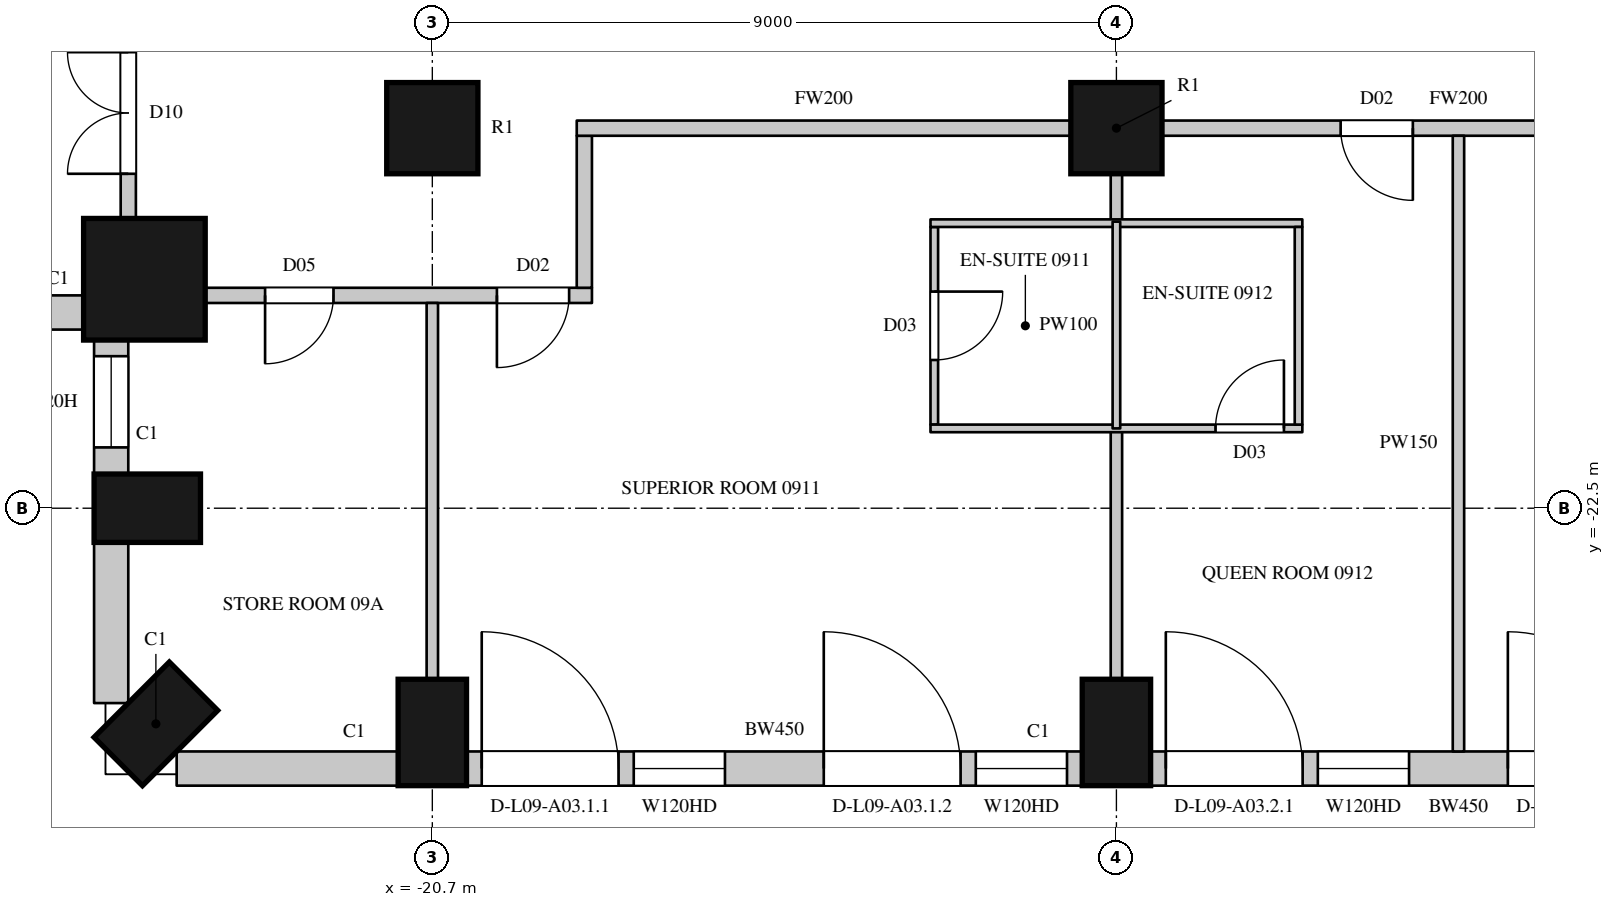
"""IFC4 building model, lengths in metres.
Left out: names, types, materials, properties, quantities, classifications, styles, units other than length and angle.
Written with IfcOpenShell. Run it as: python <this file> out.ifc"""

import sys

from ifc_helpers import new_model, si_unit, direction, frame, frame_2d, origin, origin_2d, place, context, subcontext, project, spatial, rectangle, circle, extrude, element, fill, save


model = new_model("IFC4")
c1 = context("Model", 3, precision=1e-05, world=origin(), true_north=direction((0.0, 1.0)))
c2 = subcontext(c1, "Body", "Model", "MODEL_VIEW")
j1 = project(units=[si_unit("LENGTHUNIT", "METRE"), si_unit("PLANEANGLEUNIT", "RADIAN")], contexts=[c1])
p1 = place(None, origin())
s1 = spatial("IfcSite", under=j1, at=p1, CompositionType="ELEMENT")
p2 = place(p1, origin())
s2 = spatial("IfcBuilding", under=s1, at=p2, CompositionType="ELEMENT")
p3 = place(p2, frame((0.0, 0.0, 62.7)))
s3 = spatial("IfcBuildingStorey", under=s2, at=p3, CompositionType="ELEMENT", Elevation=62.7)
p4 = place(p3, frame((-24.488, -19.488, 0.0), z_axis=(0.0, 0.0, 1.0), x_axis=(1.0, 0.0, 0.0)))
e1 = element("IfcColumn", 1, at=p4, inside=s3, PredefinedType="COLUMN", context=c2, shape_type="SweptSolid", body=[
    extrude(circle(Radius=0.8, at=origin_2d()), origin(), (0.0, 0.0, 1.0), 3.6),
])
for number, where, z_axis, x_axis in (
    (2, (-24.45, -22.5, 0.0), (0.0, 0.0, 1.0), (0.0, -1.0, 0.0)),
    (3, (-24.337, -25.337, 0.0), (0.0, 0.0, 1.0), (0.707, -0.707, 0.0)),
    (4, (-20.7, -25.45, 0.0), (0.0, 0.0, 1.0), (1.0, 0.0, 0.0)),
    (5, (-11.7, -25.45, 0.0), (0.0, 0.0, 1.0), (1.0, 0.0, 0.0)),
):
    element("IfcColumn", number, at=place(p3, frame(where, z_axis=z_axis, x_axis=x_axis)), inside=s3, PredefinedType="COLUMN", context=c2, shape_type="SweptSolid", body=[
        extrude(rectangle(XDim=0.9, YDim=1.4, at=origin_2d()), origin(), (0.0, 0.0, 1.0), 3.6),
    ])
for number, where, z_axis, x_axis in (
    (6, (-20.7, -17.5, 0.0), (0.0, 0.0, 1.0), (1.0, 0.0, 0.0)),
    (7, (-11.7, -17.5, 0.0), (0.0, 0.0, 1.0), (1.0, 0.0, 0.0)),
):
    element("IfcColumn", number, at=place(p3, frame(where, z_axis=z_axis, x_axis=x_axis)), inside=s3, PredefinedType="COLUMN", context=c2, shape_type="SweptSolid", body=[
        extrude(circle(Radius=0.6, at=origin_2d()), origin(), (0.0, 0.0, 1.0), 3.6),
    ])
p5 = place(p3, frame((-29.064, -19.925, 0.0), z_axis=(0.0, 0.0, 1.0), x_axis=(1.0, 0.0, 0.0)))
e8 = element("IfcWall", 8, at=p5, inside=s3, PredefinedType="SOLIDWALL", context=c2, shape_type="SweptSolid", body=[
    extrude(rectangle(XDim=3.805, YDim=0.45, at=frame_2d((1.903, 0.0))), origin(), (0.0, 0.0, 1.0), 3.3),
])
p6 = place(p5, frame((0.514, 0.0, 1.05)))
e9 = element("IfcOpeningElement", 9, at=p6, cuts=e8, PredefinedType="OPENING", context=c2, shape_type="SweptSolid", body=[
    extrude(rectangle(XDim=2.7, YDim=2.0, at=frame_2d((1.35, 1.0))), frame((0.0, 0.235, 0.0), z_axis=(0.0, -1.0, 0.0), x_axis=(1.0, 0.0, 0.0)), (0.0, 0.0, 1.0), 0.47),
])
p7 = place(p3, frame((-24.925, -20.259, 0.0), z_axis=(0.0, 0.0, 1.0), x_axis=(0.0, -1.0, 0.0)))
e10 = element("IfcWall", 10, at=p7, inside=s3, PredefinedType="SOLIDWALL", context=c2, shape_type="SweptSolid", body=[
    extrude(rectangle(XDim=1.792, YDim=0.45, at=frame_2d((0.896, 0.0))), origin(), (0.0, 0.0, 1.0), 3.3),
])
p8 = place(p7, frame((0.241, 0.0, 1.05)))
e11 = element("IfcOpeningElement", 11, at=p8, cuts=e10, PredefinedType="OPENING", context=c2, shape_type="SweptSolid", body=[
    extrude(rectangle(XDim=1.2, YDim=2.0, at=frame_2d((0.6, 1.0))), frame((0.0, 0.235, 0.0), z_axis=(0.0, -1.0, 0.0), x_axis=(1.0, 0.0, 0.0)), (0.0, 0.0, 1.0), 0.47),
])
p9 = place(p3, frame((-24.925, -22.95, 0.0), z_axis=(0.0, 0.0, 1.0), x_axis=(0.0, -1.0, 0.0)))
e12 = element("IfcWall", 12, at=p9, inside=s3, PredefinedType="SOLIDWALL", context=c2, shape_type="SweptSolid", body=[
    extrude(rectangle(XDim=2.114, YDim=0.45, at=frame_2d((1.057, 0.0))), origin(), (0.0, 0.0, 1.0), 3.3),
])
p10 = place(p3, frame((-24.064, -25.925, 0.0), z_axis=(0.0, 0.0, 1.0), x_axis=(1.0, 0.0, 0.0)))
e13 = element("IfcWall", 13, at=p10, inside=s3, PredefinedType="SOLIDWALL", context=c2, shape_type="SweptSolid", body=[
    extrude(rectangle(XDim=2.914, YDim=0.45, at=frame_2d((1.457, 0.0))), origin(), (0.0, 0.0, 1.0), 3.3),
])
p11 = place(p3, frame((-20.25, -25.925, 0.0), z_axis=(0.0, 0.0, 1.0), x_axis=(1.0, 0.0, 0.0)))
e14 = element("IfcWall", 14, at=p11, inside=s3, PredefinedType="SOLIDWALL", context=c2, shape_type="SweptSolid", body=[
    extrude(rectangle(XDim=8.1, YDim=0.45, at=frame_2d((4.05, 0.0))), origin(), (0.0, 0.0, 1.0), 3.3),
])
p12 = place(p11, frame((0.2, 0.0, 0.0)))
e15 = element("IfcOpeningElement", 15, at=p12, cuts=e14, PredefinedType="OPENING", context=c2, shape_type="SweptSolid", body=[
    extrude(rectangle(XDim=1.8, YDim=2.4, at=frame_2d((0.9, 1.2))), frame((0.0, 0.235, 0.0), z_axis=(0.0, -1.0, 0.0), x_axis=(1.0, 0.0, 0.0)), (0.0, 0.0, 1.0), 0.47),
])
p13 = place(p11, frame((2.2, 0.0, 1.05)))
e16 = element("IfcOpeningElement", 16, at=p13, cuts=e14, PredefinedType="OPENING", context=c2, shape_type="SweptSolid", body=[
    extrude(rectangle(XDim=1.2, YDim=2.0, at=frame_2d((0.6, 1.0))), frame((0.0, 0.235, 0.0), z_axis=(0.0, -1.0, 0.0), x_axis=(1.0, 0.0, 0.0)), (0.0, 0.0, 1.0), 0.47),
])
p14 = place(p11, frame((4.7, 0.0, 0.0)))
e17 = element("IfcOpeningElement", 17, at=p14, cuts=e14, PredefinedType="OPENING", context=c2, shape_type="SweptSolid", body=[
    extrude(rectangle(XDim=1.8, YDim=2.4, at=frame_2d((0.9, 1.2))), frame((0.0, 0.235, 0.0), z_axis=(0.0, -1.0, 0.0), x_axis=(1.0, 0.0, 0.0)), (0.0, 0.0, 1.0), 0.47),
])
p15 = place(p11, frame((6.7, 0.0, 1.05)))
e18 = element("IfcOpeningElement", 18, at=p15, cuts=e14, PredefinedType="OPENING", context=c2, shape_type="SweptSolid", body=[
    extrude(rectangle(XDim=1.2, YDim=2.0, at=frame_2d((0.6, 1.0))), frame((0.0, 0.235, 0.0), z_axis=(0.0, -1.0, 0.0), x_axis=(1.0, 0.0, 0.0)), (0.0, 0.0, 1.0), 0.47),
])
p16 = place(p3, frame((-11.25, -25.925, 0.0), z_axis=(0.0, 0.0, 1.0), x_axis=(1.0, 0.0, 0.0)))
e19 = element("IfcWall", 19, at=p16, inside=s3, PredefinedType="SOLIDWALL", context=c2, shape_type="SweptSolid", body=[
    extrude(rectangle(XDim=8.1, YDim=0.45, at=frame_2d((4.05, 0.0))), origin(), (0.0, 0.0, 1.0), 3.3),
])
p17 = place(p16, frame((0.2, 0.0, 0.0)))
e20 = element("IfcOpeningElement", 20, at=p17, cuts=e19, PredefinedType="OPENING", context=c2, shape_type="SweptSolid", body=[
    extrude(rectangle(XDim=1.8, YDim=2.4, at=frame_2d((0.9, 1.2))), frame((0.0, 0.235, 0.0), z_axis=(0.0, -1.0, 0.0), x_axis=(1.0, 0.0, 0.0)), (0.0, 0.0, 1.0), 0.47),
])
p18 = place(p16, frame((2.2, 0.0, 1.05)))
e21 = element("IfcOpeningElement", 21, at=p18, cuts=e19, PredefinedType="OPENING", context=c2, shape_type="SweptSolid", body=[
    extrude(rectangle(XDim=1.2, YDim=2.0, at=frame_2d((0.6, 1.0))), frame((0.0, 0.235, 0.0), z_axis=(0.0, -1.0, 0.0), x_axis=(1.0, 0.0, 0.0)), (0.0, 0.0, 1.0), 0.47),
])
p19 = place(p16, frame((4.7, 0.0, 0.0)))
e22 = element("IfcOpeningElement", 22, at=p19, cuts=e19, PredefinedType="OPENING", context=c2, shape_type="SweptSolid", body=[
    extrude(rectangle(XDim=1.8, YDim=2.4, at=frame_2d((0.9, 1.2))), frame((0.0, 0.235, 0.0), z_axis=(0.0, -1.0, 0.0), x_axis=(1.0, 0.0, 0.0)), (0.0, 0.0, 1.0), 0.47),
])
p20 = place(p16, frame((6.7, 0.0, 1.05)))
e23 = element("IfcOpeningElement", 23, at=p20, cuts=e19, PredefinedType="OPENING", context=c2, shape_type="SweptSolid", body=[
    extrude(rectangle(XDim=1.2, YDim=2.0, at=frame_2d((0.6, 1.0))), frame((0.0, 0.235, 0.0), z_axis=(0.0, -1.0, 0.0), x_axis=(1.0, 0.0, 0.0)), (0.0, 0.0, 1.0), 0.47),
])
p21 = place(p3, frame((-24.7, -18.7, 0.0), z_axis=(0.0, 0.0, 1.0), x_axis=(0.0, 1.0, 0.0)))
e24 = element("IfcWall", 24, at=p21, inside=s3, PredefinedType="PARTITIONING", context=c2, shape_type="SweptSolid", body=[
    extrude(rectangle(XDim=2.67, YDim=0.2, at=frame_2d((1.335, 0.0))), origin(), (0.0, 0.0, 1.0), 3.3),
])
p22 = place(p21, frame((0.6, 0.0, 0.0)))
e25 = element("IfcOpeningElement", 25, at=p22, cuts=e24, PredefinedType="OPENING", context=c2, shape_type="SweptSolid", body=[
    extrude(rectangle(XDim=1.6, YDim=2.4, at=frame_2d((0.8, 1.2))), frame((0.0, 0.11, 0.0), z_axis=(0.0, -1.0, 0.0), x_axis=(1.0, 0.0, 0.0)), (0.0, 0.0, 1.0), 0.22),
])
p23 = place(p3, frame((-23.7, -19.7, 0.0), z_axis=(0.0, 0.0, 1.0), x_axis=(1.0, 0.0, 0.0)))
e26 = element("IfcWall", 26, at=p23, inside=s3, PredefinedType="PARTITIONING", context=c2, shape_type="SweptSolid", body=[
    extrude(rectangle(XDim=5.1, YDim=0.2, at=frame_2d((2.55, 0.0))), origin(), (0.0, 0.0, 1.0), 3.3),
])
p24 = place(p23, frame((0.8, 0.0, 0.0)))
e27 = element("IfcOpeningElement", 27, at=p24, cuts=e26, PredefinedType="OPENING", context=c2, shape_type="SweptSolid", body=[
    extrude(rectangle(XDim=0.9, YDim=2.2, at=frame_2d((0.45, 1.1))), frame((0.0, 0.11, 0.0), z_axis=(0.0, -1.0, 0.0), x_axis=(1.0, 0.0, 0.0)), (0.0, 0.0, 1.0), 0.22),
])
p25 = place(p23, frame((3.85, 0.0, 0.0)))
e28 = element("IfcOpeningElement", 28, at=p25, cuts=e26, PredefinedType="OPENING", context=c2, shape_type="SweptSolid", body=[
    extrude(rectangle(XDim=0.95, YDim=2.2, at=frame_2d((0.475, 1.1))), frame((0.0, 0.11, 0.0), z_axis=(0.0, -1.0, 0.0), x_axis=(1.0, 0.0, 0.0)), (0.0, 0.0, 1.0), 0.22),
])
p26 = place(p3, frame((-18.7, -19.6, 0.0), z_axis=(0.0, 0.0, 1.0), x_axis=(0.0, 1.0, 0.0)))
e29 = element("IfcWall", 29, at=p26, inside=s3, PredefinedType="PARTITIONING", context=c2, shape_type="SweptSolid", body=[
    extrude(rectangle(XDim=2.0, YDim=0.2, at=frame_2d((1.0, 0.0))), origin(), (0.0, 0.0, 1.0), 3.3),
])
p27 = place(p3, frame((-18.8, -17.5, 0.0), z_axis=(0.0, 0.0, 1.0), x_axis=(1.0, 0.0, 0.0)))
e30 = element("IfcWall", 30, at=p27, inside=s3, PredefinedType="PARTITIONING", context=c2, shape_type="SweptSolid", body=[
    extrude(rectangle(XDim=6.5, YDim=0.2, at=frame_2d((3.25, 0.0))), origin(), (0.0, 0.0, 1.0), 2.75),
])
p28 = place(p3, frame((-11.1, -17.5, 0.0), z_axis=(0.0, 0.0, 1.0), x_axis=(1.0, 0.0, 0.0)))
e31 = element("IfcWall", 31, at=p28, inside=s3, PredefinedType="PARTITIONING", context=c2, shape_type="SweptSolid", body=[
    extrude(rectangle(XDim=7.8, YDim=0.2, at=frame_2d((3.9, 0.0))), origin(), (0.0, 0.0, 1.0), 2.75),
])
p29 = place(p28, frame((2.35, 0.0, 0.0)))
e32 = element("IfcOpeningElement", 32, at=p29, cuts=e31, PredefinedType="OPENING", context=c2, shape_type="SweptSolid", body=[
    extrude(rectangle(XDim=0.95, YDim=2.2, at=frame_2d((0.475, 1.1))), frame((0.0, 0.11, 0.0), z_axis=(0.0, -1.0, 0.0), x_axis=(1.0, 0.0, 0.0)), (0.0, 0.0, 1.0), 0.22),
])
p30 = place(p28, frame((5.2, 0.0, 0.0)))
e33 = element("IfcOpeningElement", 33, at=p30, cuts=e31, PredefinedType="OPENING", context=c2, shape_type="SweptSolid", body=[
    extrude(rectangle(XDim=0.95, YDim=2.2, at=frame_2d((0.475, 1.1))), frame((0.0, 0.11, 0.0), z_axis=(0.0, -1.0, 0.0), x_axis=(1.0, 0.0, 0.0)), (0.0, 0.0, 1.0), 0.22),
])
p31 = place(p3, frame((-20.7, -24.75, 0.0), z_axis=(0.0, 0.0, 1.0), x_axis=(0.0, 1.0, 0.0)))
e34 = element("IfcWall", 34, at=p31, inside=s3, PredefinedType="PARTITIONING", context=c2, shape_type="SweptSolid", body=[
    extrude(rectangle(XDim=4.95, YDim=0.15, at=frame_2d((2.475, 0.0))), origin(), (0.0, 0.0, 1.0), 2.75),
])
p32 = place(p3, frame((-11.7, -24.75, 0.0), z_axis=(0.0, 0.0, 1.0), x_axis=(0.0, 1.0, 0.0)))
e35 = element("IfcWall", 35, at=p32, inside=s3, PredefinedType="PARTITIONING", context=c2, shape_type="SweptSolid", body=[
    extrude(rectangle(XDim=3.3, YDim=0.15, at=frame_2d((1.65, 0.0))), origin(), (0.0, 0.0, 1.0), 2.75),
])
p33 = place(p3, frame((-11.7, -18.73, 0.0), z_axis=(0.0, 0.0, 1.0), x_axis=(0.0, 1.0, 0.0)))
e36 = element("IfcWall", 36, at=p33, inside=s3, PredefinedType="PARTITIONING", context=c2, shape_type="SweptSolid", body=[
    extrude(rectangle(XDim=0.63, YDim=0.15, at=frame_2d((0.315, 0.0))), origin(), (0.0, 0.0, 1.0), 2.75),
])
p34 = place(p3, frame((-7.2, -25.7, 0.0), z_axis=(0.0, 0.0, 1.0), x_axis=(0.0, 1.0, 0.0)))
e37 = element("IfcWall", 37, at=p34, inside=s3, PredefinedType="PARTITIONING", context=c2, shape_type="SweptSolid", body=[
    extrude(rectangle(XDim=8.1, YDim=0.15, at=frame_2d((4.05, 0.0))), origin(), (0.0, 0.0, 1.0), 2.65),
])
p35 = place(p3, frame((-14.096, -21.4, 0.0), z_axis=(0.0, 0.0, 1.0), x_axis=(0.0, 1.0, 0.0)))
e38 = element("IfcWall", 38, at=p35, inside=s3, PredefinedType="PARTITIONING", context=c2, shape_type="SweptSolid", body=[
    extrude(rectangle(XDim=2.6, YDim=0.1, at=frame_2d((1.3, 0.0))), origin(), (0.0, 0.0, 1.0), 3.3),
])
p36 = place(p35, frame((0.85, 0.0, 0.0)))
e39 = element("IfcOpeningElement", 39, at=p36, cuts=e38, PredefinedType="OPENING", context=c2, shape_type="SweptSolid", body=[
    extrude(rectangle(XDim=0.9, YDim=2.2, at=frame_2d((0.45, 1.1))), frame((0.0, 0.06, 0.0), z_axis=(0.0, -1.0, 0.0), x_axis=(1.0, 0.0, 0.0)), (0.0, 0.0, 1.0), 0.12),
])
p37 = place(p3, frame((-14.146, -21.45, 0.0), z_axis=(0.0, 0.0, 1.0), x_axis=(1.0, 0.0, 0.0)))
e40 = element("IfcWall", 40, at=p37, inside=s3, PredefinedType="PARTITIONING", context=c2, shape_type="SweptSolid", body=[
    extrude(rectangle(XDim=4.892, YDim=0.1, at=frame_2d((2.446, 0.0))), origin(), (0.0, 0.0, 1.0), 3.3),
])
p38 = place(p37, frame((3.75, 0.0, 0.0)))
e41 = element("IfcOpeningElement", 41, at=p38, cuts=e40, PredefinedType="OPENING", context=c2, shape_type="SweptSolid", body=[
    extrude(rectangle(XDim=0.9, YDim=2.2, at=frame_2d((0.45, 1.1))), frame((0.0, 0.06, 0.0), z_axis=(0.0, -1.0, 0.0), x_axis=(1.0, 0.0, 0.0)), (0.0, 0.0, 1.0), 0.12),
])
p39 = place(p3, frame((-14.146, -18.75, 0.0), z_axis=(0.0, 0.0, 1.0), x_axis=(1.0, 0.0, 0.0)))
e42 = element("IfcWall", 42, at=p39, inside=s3, PredefinedType="PARTITIONING", context=c2, shape_type="SweptSolid", body=[
    extrude(rectangle(XDim=4.892, YDim=0.1, at=frame_2d((2.446, 0.0))), origin(), (0.0, 0.0, 1.0), 3.3),
])
p40 = place(p3, frame((-11.7, -21.45, 0.0), z_axis=(0.0, 0.0, 1.0), x_axis=(0.0, 1.0, 0.0)))
e43 = element("IfcWall", 43, at=p40, inside=s3, PredefinedType="PARTITIONING", context=c2, shape_type="SweptSolid", body=[
    extrude(rectangle(XDim=2.72, YDim=0.1, at=frame_2d((1.36, 0.0))), origin(), (0.0, 0.0, 1.0), 2.75),
])
p41 = place(p3, frame((-9.304, -21.4, 0.0), z_axis=(0.0, 0.0, 1.0), x_axis=(0.0, 1.0, 0.0)))
e44 = element("IfcWall", 44, at=p41, inside=s3, PredefinedType="PARTITIONING", context=c2, shape_type="SweptSolid", body=[
    extrude(rectangle(XDim=2.6, YDim=0.1, at=frame_2d((1.3, 0.0))), origin(), (0.0, 0.0, 1.0), 3.3),
])
p42 = place(p8, origin())
e45 = element("IfcWindow", 45, at=p42, inside=s3, PartitioningType="SINGLE_PANEL", PredefinedType="WINDOW", context=c2, shape_type="SweptSolid", body=[
    extrude(rectangle(XDim=1.2, YDim=2.0, at=frame_2d((0.6, 1.0))), frame((0.0, 0.135, 0.0), z_axis=(0.0, -1.0, 0.0), x_axis=(1.0, 0.0, 0.0)), (0.0, 0.0, 1.0), 0.06),
])
fill(e11, e45)
p43 = place(p12, origin())
e46 = element("IfcDoor", 46, at=p43, inside=s3, OperationType="SLIDING_TO_LEFT", PredefinedType="DOOR", context=c2, shape_type="SweptSolid", body=[
    extrude(rectangle(XDim=1.8, YDim=2.4, at=frame_2d((0.9, 1.2))), frame((0.0, 0.13, 0.0), z_axis=(0.0, -1.0, 0.0), x_axis=(1.0, 0.0, 0.0)), (0.0, 0.0, 1.0), 0.05),
])
fill(e15, e46)
p44 = place(p13, origin())
e47 = element("IfcWindow", 47, at=p44, inside=s3, PartitioningType="SINGLE_PANEL", PredefinedType="WINDOW", context=c2, shape_type="SweptSolid", body=[
    extrude(rectangle(XDim=1.2, YDim=2.0, at=frame_2d((0.6, 1.0))), frame((0.0, 0.135, 0.0), z_axis=(0.0, -1.0, 0.0), x_axis=(1.0, 0.0, 0.0)), (0.0, 0.0, 1.0), 0.06),
])
fill(e16, e47)
p45 = place(p14, origin())
e48 = element("IfcDoor", 48, at=p45, inside=s3, OperationType="SLIDING_TO_LEFT", PredefinedType="DOOR", context=c2, shape_type="SweptSolid", body=[
    extrude(rectangle(XDim=1.8, YDim=2.4, at=frame_2d((0.9, 1.2))), frame((0.0, 0.13, 0.0), z_axis=(0.0, -1.0, 0.0), x_axis=(1.0, 0.0, 0.0)), (0.0, 0.0, 1.0), 0.05),
])
fill(e17, e48)
p46 = place(p15, origin())
e49 = element("IfcWindow", 49, at=p46, inside=s3, PartitioningType="SINGLE_PANEL", PredefinedType="WINDOW", context=c2, shape_type="SweptSolid", body=[
    extrude(rectangle(XDim=1.2, YDim=2.0, at=frame_2d((0.6, 1.0))), frame((0.0, 0.135, 0.0), z_axis=(0.0, -1.0, 0.0), x_axis=(1.0, 0.0, 0.0)), (0.0, 0.0, 1.0), 0.06),
])
fill(e18, e49)
p47 = place(p17, origin())
e50 = element("IfcDoor", 50, at=p47, inside=s3, OperationType="SLIDING_TO_LEFT", PredefinedType="DOOR", context=c2, shape_type="SweptSolid", body=[
    extrude(rectangle(XDim=1.8, YDim=2.4, at=frame_2d((0.9, 1.2))), frame((0.0, 0.13, 0.0), z_axis=(0.0, -1.0, 0.0), x_axis=(1.0, 0.0, 0.0)), (0.0, 0.0, 1.0), 0.05),
])
fill(e20, e50)
p48 = place(p18, origin())
e51 = element("IfcWindow", 51, at=p48, inside=s3, PartitioningType="SINGLE_PANEL", PredefinedType="WINDOW", context=c2, shape_type="SweptSolid", body=[
    extrude(rectangle(XDim=1.2, YDim=2.0, at=frame_2d((0.6, 1.0))), frame((0.0, 0.135, 0.0), z_axis=(0.0, -1.0, 0.0), x_axis=(1.0, 0.0, 0.0)), (0.0, 0.0, 1.0), 0.06),
])
fill(e21, e51)
p49 = place(p19, origin())
e52 = element("IfcDoor", 52, at=p49, inside=s3, OperationType="SLIDING_TO_LEFT", PredefinedType="DOOR", context=c2, shape_type="SweptSolid", body=[
    extrude(rectangle(XDim=1.8, YDim=2.4, at=frame_2d((0.9, 1.2))), frame((0.0, 0.13, 0.0), z_axis=(0.0, -1.0, 0.0), x_axis=(1.0, 0.0, 0.0)), (0.0, 0.0, 1.0), 0.05),
])
fill(e22, e52)
p50 = place(p24, origin())
e53 = element("IfcDoor", 53, at=p50, inside=s3, OperationType="SINGLE_SWING_RIGHT", PredefinedType="DOOR", context=c2, shape_type="SweptSolid", body=[
    extrude(rectangle(XDim=0.9, YDim=2.2, at=frame_2d((0.45, 1.1))), frame((0.0, 0.025, 0.0), z_axis=(0.0, -1.0, 0.0), x_axis=(1.0, 0.0, 0.0)), (0.0, 0.0, 1.0), 0.05),
])
fill(e27, e53)
p51 = place(p22, origin())
e54 = element("IfcDoor", 54, at=p51, inside=s3, OperationType="DOUBLE_DOOR_SINGLE_SWING", PredefinedType="DOOR", context=c2, shape_type="SweptSolid", body=[
    extrude(rectangle(XDim=1.6, YDim=2.4, at=frame_2d((0.8, 1.2))), frame((0.0, 0.025, 0.0), z_axis=(0.0, -1.0, 0.0), x_axis=(1.0, 0.0, 0.0)), (0.0, 0.0, 1.0), 0.05),
])
fill(e25, e54)
p52 = place(p25, origin())
e55 = element("IfcDoor", 55, at=p52, inside=s3, OperationType="SINGLE_SWING_RIGHT", PredefinedType="DOOR", context=c2, shape_type="SweptSolid", body=[
    extrude(rectangle(XDim=0.95, YDim=2.2, at=frame_2d((0.475, 1.1))), frame((0.0, 0.025, 0.0), z_axis=(0.0, -1.0, 0.0), x_axis=(1.0, 0.0, 0.0)), (0.0, 0.0, 1.0), 0.05),
])
fill(e28, e55)
p53 = place(p36, origin())
e56 = element("IfcDoor", 56, at=p53, inside=s3, OperationType="SINGLE_SWING_LEFT", PredefinedType="DOOR", context=c2, shape_type="SweptSolid", body=[
    extrude(rectangle(XDim=0.9, YDim=2.2, at=frame_2d((0.45, 1.1))), frame((0.0, 0.025, 0.0), z_axis=(0.0, -1.0, 0.0), x_axis=(1.0, 0.0, 0.0)), (0.0, 0.0, 1.0), 0.05),
])
fill(e39, e56)
p54 = place(p29, origin())
e57 = element("IfcDoor", 57, at=p54, inside=s3, OperationType="SINGLE_SWING_LEFT", PredefinedType="DOOR", context=c2, shape_type="SweptSolid", body=[
    extrude(rectangle(XDim=0.95, YDim=2.2, at=frame_2d((0.475, 1.1))), frame((0.0, 0.025, 0.0), z_axis=(0.0, -1.0, 0.0), x_axis=(1.0, 0.0, 0.0)), (0.0, 0.0, 1.0), 0.05),
])
fill(e32, e57)
p55 = place(p38, origin())
e58 = element("IfcDoor", 58, at=p55, inside=s3, OperationType="SINGLE_SWING_RIGHT", PredefinedType="DOOR", context=c2, shape_type="SweptSolid", body=[
    extrude(rectangle(XDim=0.9, YDim=2.2, at=frame_2d((0.45, 1.1))), frame((0.0, 0.025, 0.0), z_axis=(0.0, -1.0, 0.0), x_axis=(1.0, 0.0, 0.0)), (0.0, 0.0, 1.0), 0.05),
])
fill(e41, e58)
save(model, sys.argv[1])
